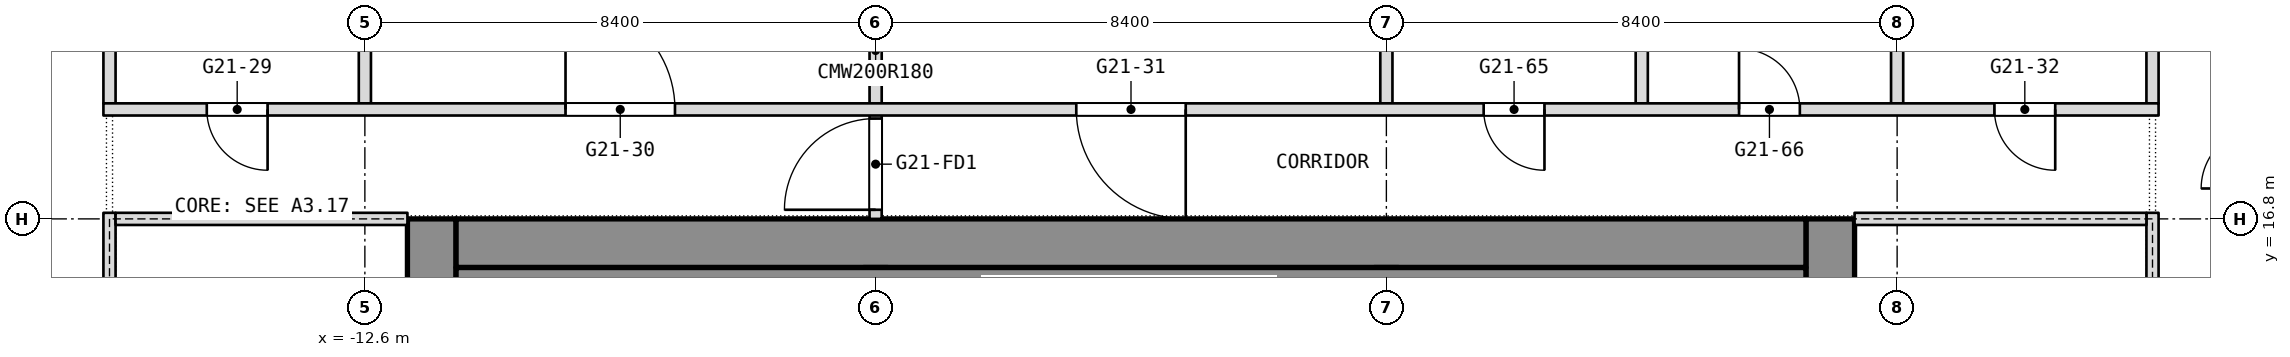
"""IFC4 building model, lengths in metres.
Left out: names, types, materials, properties, quantities, classifications, styles, units other than length and angle.
Written with IfcOpenShell. Run it as: python <this file> out.ifc"""

import sys

from ifc_helpers import new_model, si_unit, direction, frame, frame_2d, origin, place, context, subcontext, project, spatial, rectangle, extrude, element, fill, save


model = new_model("IFC4")
c1 = context("Model", 3, precision=1e-05, world=origin(), true_north=direction((0.0, 1.0)))
c2 = subcontext(c1, "Body", "Model", "MODEL_VIEW")
j1 = project(units=[si_unit("LENGTHUNIT", "METRE"), si_unit("PLANEANGLEUNIT", "RADIAN")], contexts=[c1])
p1 = place(None, origin())
s1 = spatial("IfcSite", under=j1, at=p1, CompositionType="ELEMENT")
p2 = place(p1, origin())
s2 = spatial("IfcBuilding", under=s1, at=p2, CompositionType="ELEMENT")
p3 = place(p2, frame((0.0, 0.0, 245.3)))
s3 = spatial("IfcBuildingStorey", under=s2, at=p3, CompositionType="ELEMENT", Elevation=245.3)
p4 = place(p3, frame((11.5, 0.0, 0.0), z_axis=(0.0, 0.0, 1.0), x_axis=(0.0, 1.0, 0.0)))
e1 = element("IfcWall", 1, at=p4, inside=s3, PredefinedType="SHEAR", context=c2, shape_type="SweptSolid", body=[
    extrude(rectangle(XDim=16.8, YDim=0.8, at=frame_2d((8.4, 0.0))), origin(), (0.0, 0.0, 1.0), 3.6),
])
p5 = place(p4, frame((2.3, 0.0, 0.0)))
e2 = element("IfcOpeningElement", 2, at=p5, cuts=e1, PredefinedType="OPENING", context=c2, shape_type="SweptSolid", body=[
    extrude(rectangle(XDim=1.1, YDim=2.1, at=frame_2d((0.55, 1.05))), frame((0.0, 0.4, 0.0), z_axis=(0.0, -1.0, 0.0), x_axis=(1.0, 0.0, 0.0)), (0.0, 0.0, 1.0), 0.8),
])
p6 = place(p4, frame((4.85, 0.0, 0.0)))
e3 = element("IfcOpeningElement", 3, at=p6, cuts=e1, PredefinedType="OPENING", context=c2, shape_type="SweptSolid", body=[
    extrude(rectangle(XDim=1.1, YDim=2.1, at=frame_2d((0.55, 1.05))), frame((0.0, 0.4, 0.0), z_axis=(0.0, -1.0, 0.0), x_axis=(1.0, 0.0, 0.0)), (0.0, 0.0, 1.0), 0.8),
])
p7 = place(p4, frame((6.825, 0.0, 0.0)))
e4 = element("IfcOpeningElement", 4, at=p7, cuts=e1, PredefinedType="OPENING", context=c2, shape_type="SweptSolid", body=[
    extrude(rectangle(XDim=1.2, YDim=2.1, at=frame_2d((0.6, 1.05))), frame((0.0, 0.4, 0.0), z_axis=(0.0, -1.0, 0.0), x_axis=(1.0, 0.0, 0.0)), (0.0, 0.0, 1.0), 0.8),
])
p8 = place(p4, frame((13.4, 0.0, 0.0)))
e5 = element("IfcOpeningElement", 5, at=p8, cuts=e1, PredefinedType="OPENING", context=c2, shape_type="SweptSolid", body=[
    extrude(rectangle(XDim=1.1, YDim=2.1, at=frame_2d((0.55, 1.05))), frame((0.0, 0.4, 0.0), z_axis=(0.0, -1.0, 0.0), x_axis=(1.0, 0.0, 0.0)), (0.0, 0.0, 1.0), 0.8),
])
p9 = place(p4, frame((10.85, 0.0, 0.0)))
e6 = element("IfcOpeningElement", 6, at=p9, cuts=e1, PredefinedType="OPENING", context=c2, shape_type="SweptSolid", body=[
    extrude(rectangle(XDim=1.1, YDim=2.1, at=frame_2d((0.55, 1.05))), frame((0.0, 0.4, 0.0), z_axis=(0.0, -1.0, 0.0), x_axis=(1.0, 0.0, 0.0)), (0.0, 0.0, 1.0), 0.8),
])
p10 = place(p4, frame((8.775, 0.0, 0.0)))
e7 = element("IfcOpeningElement", 7, at=p10, cuts=e1, PredefinedType="OPENING", context=c2, shape_type="SweptSolid", body=[
    extrude(rectangle(XDim=1.2, YDim=2.1, at=frame_2d((0.6, 1.05))), frame((0.0, 0.4, 0.0), z_axis=(0.0, -1.0, 0.0), x_axis=(1.0, 0.0, 0.0)), (0.0, 0.0, 1.0), 0.8),
])
p11 = place(p3, frame((-11.5, 0.0, 0.0), z_axis=(0.0, 0.0, 1.0), x_axis=(0.0, 1.0, 0.0)))
e8 = element("IfcWall", 8, at=p11, inside=s3, PredefinedType="SHEAR", context=c2, shape_type="SweptSolid", body=[
    extrude(rectangle(XDim=16.8, YDim=0.8, at=frame_2d((8.4, 0.0))), origin(), (0.0, 0.0, 1.0), 3.6),
])
p12 = place(p11, frame((3.6, 0.0, 0.0)))
e9 = element("IfcOpeningElement", 9, at=p12, cuts=e8, PredefinedType="OPENING", context=c2, shape_type="SweptSolid", body=[
    extrude(rectangle(XDim=0.9, YDim=2.1, at=frame_2d((0.45, 1.05))), frame((0.0, 0.4, 0.0), z_axis=(0.0, -1.0, 0.0), x_axis=(1.0, 0.0, 0.0)), (0.0, 0.0, 1.0), 0.8),
])
p13 = place(p11, frame((6.825, 0.0, 0.0)))
e10 = element("IfcOpeningElement", 10, at=p13, cuts=e8, PredefinedType="OPENING", context=c2, shape_type="SweptSolid", body=[
    extrude(rectangle(XDim=1.2, YDim=2.1, at=frame_2d((0.6, 1.05))), frame((0.0, 0.4, 0.0), z_axis=(0.0, -1.0, 0.0), x_axis=(1.0, 0.0, 0.0)), (0.0, 0.0, 1.0), 0.8),
])
p14 = place(p11, frame((14.062, 0.0, 0.0)))
e11 = element("IfcOpeningElement", 11, at=p14, cuts=e8, PredefinedType="OPENING", context=c2, shape_type="SweptSolid", body=[
    extrude(rectangle(XDim=0.9, YDim=2.1, at=frame_2d((0.45, 1.05))), frame((0.0, 0.4, 0.0), z_axis=(0.0, -1.0, 0.0), x_axis=(1.0, 0.0, 0.0)), (0.0, 0.0, 1.0), 0.8),
])
p15 = place(p11, frame((11.438, 0.0, 0.0)))
e12 = element("IfcOpeningElement", 12, at=p15, cuts=e8, PredefinedType="OPENING", context=c2, shape_type="SweptSolid", body=[
    extrude(rectangle(XDim=0.9, YDim=2.1, at=frame_2d((0.45, 1.05))), frame((0.0, 0.4, 0.0), z_axis=(0.0, -1.0, 0.0), x_axis=(1.0, 0.0, 0.0)), (0.0, 0.0, 1.0), 0.8),
])
p16 = place(p11, frame((8.775, 0.0, 0.0)))
e13 = element("IfcOpeningElement", 13, at=p16, cuts=e8, PredefinedType="OPENING", context=c2, shape_type="SweptSolid", body=[
    extrude(rectangle(XDim=1.2, YDim=2.1, at=frame_2d((0.6, 1.05))), frame((0.0, 0.4, 0.0), z_axis=(0.0, -1.0, 0.0), x_axis=(1.0, 0.0, 0.0)), (0.0, 0.0, 1.0), 0.8),
])
p17 = place(p3, frame((-11.1, 16.4, 0.0), z_axis=(0.0, 0.0, 1.0), x_axis=(1.0, 0.0, 0.0)))
e14 = element("IfcWall", 14, at=p17, inside=s3, PredefinedType="SHEAR", context=c2, shape_type="SweptSolid", body=[
    extrude(rectangle(XDim=22.2, YDim=0.8, at=frame_2d((11.1, 0.0))), origin(), (0.0, 0.0, 1.0), 3.6),
])
p18 = place(p3, frame((-4.2, 0.8, 0.0), z_axis=(0.0, 0.0, 1.0), x_axis=(0.0, 1.0, 0.0)))
e15 = element("IfcWall", 15, at=p18, inside=s3, PredefinedType="SHEAR", context=c2, shape_type="SweptSolid", body=[
    extrude(rectangle(XDim=15.2, YDim=0.4, at=frame_2d((7.6, 0.0))), origin(), (0.0, 0.0, 1.0), 3.6),
])
p19 = place(p18, frame((8.5, 0.0, 0.0)))
e16 = element("IfcOpeningElement", 16, at=p19, cuts=e15, PredefinedType="OPENING", context=c2, shape_type="SweptSolid", body=[
    extrude(rectangle(XDim=1.2, YDim=2.1, at=frame_2d((0.6, 1.05))), frame((0.0, 0.2, 0.0), z_axis=(0.0, -1.0, 0.0), x_axis=(1.0, 0.0, 0.0)), (0.0, 0.0, 1.0), 0.4),
])
p20 = place(p3, frame((4.2, 0.8, 0.0), z_axis=(0.0, 0.0, 1.0), x_axis=(0.0, 1.0, 0.0)))
e17 = element("IfcWall", 17, at=p20, inside=s3, PredefinedType="SHEAR", context=c2, shape_type="SweptSolid", body=[
    extrude(rectangle(XDim=15.2, YDim=0.4, at=frame_2d((7.6, 0.0))), origin(), (0.0, 0.0, 1.0), 3.6),
])
p21 = place(p20, frame((5.95, 0.0, 0.0)))
e18 = element("IfcOpeningElement", 18, at=p21, cuts=e17, PredefinedType="OPENING", context=c2, shape_type="SweptSolid", body=[
    extrude(rectangle(XDim=1.2, YDim=2.1, at=frame_2d((0.6, 1.05))), frame((0.0, 0.2, 0.0), z_axis=(0.0, -1.0, 0.0), x_axis=(1.0, 0.0, 0.0)), (0.0, 0.0, 1.0), 0.4),
])
for number, where, z_axis, x_axis in (
    (19, (16.8, 18.7, 0.0), (0.0, 0.0, 1.0), (0.0, 1.0, 0.0)),
    (20, (12.6, 18.7, 0.0), (0.0, 0.0, 1.0), (0.0, 1.0, 0.0)),
    (21, (8.4, 18.7, 0.0), (0.0, 0.0, 1.0), (0.0, 1.0, 0.0)),
    (22, (4.2, 18.7, 0.0), (0.0, 0.0, 1.0), (0.0, 1.0, 0.0)),
):
    element("IfcWall", number, at=place(p3, frame(where, z_axis=z_axis, x_axis=x_axis)), inside=s3, PredefinedType="PARTITIONING", context=c2, shape_type="SweptSolid", body=[
        extrude(rectangle(XDim=3.64, YDim=0.2, at=frame_2d((1.82, 0.0))), origin(), (0.0, 0.0, 1.0), 3.34),
    ])
p22 = place(p3, frame((-4.2, 16.8, 0.0), z_axis=(0.0, 0.0, 1.0), x_axis=(0.0, 1.0, 0.0)))
e23 = element("IfcWall", 23, at=p22, inside=s3, PredefinedType="PARTITIONING", context=c2, shape_type="SweptSolid", body=[
    extrude(rectangle(XDim=5.54, YDim=0.2, at=frame_2d((2.77, 0.0))), origin(), (0.0, 0.0, 1.0), 3.34),
])
p23 = place(p22, frame((0.15, 0.0, 0.0)))
e24 = element("IfcOpeningElement", 24, at=p23, cuts=e23, PredefinedType="OPENING", context=c2, shape_type="SweptSolid", body=[
    extrude(rectangle(XDim=1.5, YDim=2.1, at=frame_2d((0.75, 1.05))), frame((0.0, 0.1, 0.0), z_axis=(0.0, -1.0, 0.0), x_axis=(1.0, 0.0, 0.0)), (0.0, 0.0, 1.0), 0.2),
])
for number, where, z_axis, x_axis in (
    (25, (-12.6, 18.7, 0.0), (0.0, 0.0, 1.0), (0.0, 1.0, 0.0)),
    (26, (-16.8, 18.7, 0.0), (0.0, 0.0, 1.0), (0.0, 1.0, 0.0)),
):
    element("IfcWall", number, at=place(p3, frame(where, z_axis=z_axis, x_axis=x_axis)), inside=s3, PredefinedType="PARTITIONING", context=c2, shape_type="SweptSolid", body=[
        extrude(rectangle(XDim=3.64, YDim=0.2, at=frame_2d((1.82, 0.0))), origin(), (0.0, 0.0, 1.0), 3.34),
    ])
p24 = place(p3, frame((-16.9, 18.6, 0.0), z_axis=(0.0, 0.0, 1.0), x_axis=(1.0, 0.0, 0.0)))
e27 = element("IfcWall", 27, at=p24, inside=s3, PredefinedType="PARTITIONING", context=c2, shape_type="SweptSolid", body=[
    extrude(rectangle(XDim=33.8, YDim=0.2, at=frame_2d((16.9, 0.0))), origin(), (0.0, 0.0, 1.0), 3.34),
])
p25 = place(p24, frame((1.7, 0.0, 0.0)))
e28 = element("IfcOpeningElement", 28, at=p25, cuts=e27, PredefinedType="OPENING", context=c2, shape_type="SweptSolid", body=[
    extrude(rectangle(XDim=1.0, YDim=2.1, at=frame_2d((0.5, 1.05))), frame((0.0, 0.1, 0.0), z_axis=(0.0, -1.0, 0.0), x_axis=(1.0, 0.0, 0.0)), (0.0, 0.0, 1.0), 0.2),
])
p26 = place(p24, frame((7.6, 0.0, 0.0)))
e29 = element("IfcOpeningElement", 29, at=p26, cuts=e27, PredefinedType="OPENING", context=c2, shape_type="SweptSolid", body=[
    extrude(rectangle(XDim=1.8, YDim=2.1, at=frame_2d((0.9, 1.05))), frame((0.0, 0.1, 0.0), z_axis=(0.0, -1.0, 0.0), x_axis=(1.0, 0.0, 0.0)), (0.0, 0.0, 1.0), 0.2),
])
p27 = place(p24, frame((16.0, 0.0, 0.0)))
e30 = element("IfcOpeningElement", 30, at=p27, cuts=e27, PredefinedType="OPENING", context=c2, shape_type="SweptSolid", body=[
    extrude(rectangle(XDim=1.8, YDim=2.1, at=frame_2d((0.9, 1.05))), frame((0.0, 0.1, 0.0), z_axis=(0.0, -1.0, 0.0), x_axis=(1.0, 0.0, 0.0)), (0.0, 0.0, 1.0), 0.2),
])
p28 = place(p24, frame((31.1, 0.0, 0.0)))
e31 = element("IfcOpeningElement", 31, at=p28, cuts=e27, PredefinedType="OPENING", context=c2, shape_type="SweptSolid", body=[
    extrude(rectangle(XDim=1.0, YDim=2.1, at=frame_2d((0.5, 1.05))), frame((0.0, 0.1, 0.0), z_axis=(0.0, -1.0, 0.0), x_axis=(1.0, 0.0, 0.0)), (0.0, 0.0, 1.0), 0.2),
])
p29 = place(p24, frame((22.7, 0.0, 0.0)))
e32 = element("IfcOpeningElement", 32, at=p29, cuts=e27, PredefinedType="OPENING", context=c2, shape_type="SweptSolid", body=[
    extrude(rectangle(XDim=1.0, YDim=2.1, at=frame_2d((0.5, 1.05))), frame((0.0, 0.1, 0.0), z_axis=(0.0, -1.0, 0.0), x_axis=(1.0, 0.0, 0.0)), (0.0, 0.0, 1.0), 0.2),
])
p30 = place(p24, frame((26.9, 0.0, 0.0)))
e33 = element("IfcOpeningElement", 33, at=p30, cuts=e27, PredefinedType="OPENING", context=c2, shape_type="SweptSolid", body=[
    extrude(rectangle(XDim=1.0, YDim=2.1, at=frame_2d((0.5, 1.05))), frame((0.0, 0.1, 0.0), z_axis=(0.0, -1.0, 0.0), x_axis=(1.0, 0.0, 0.0)), (0.0, 0.0, 1.0), 0.2),
])
p31 = place(p3, frame((-11.1, 15.65, 0.0), z_axis=(0.0, 0.0, 1.0), x_axis=(1.0, 0.0, 0.0)))
e34 = element("IfcWall", 34, at=p31, inside=s3, PredefinedType="PARTITIONING", context=c2, shape_type="SweptSolid", body=[
    extrude(rectangle(XDim=22.2, YDim=0.7, at=frame_2d((11.1, 0.0))), origin(), (0.0, 0.0, 1.0), 3.34),
])
p32 = place(p3, frame((-16.8, -0.1, 0.0), z_axis=(0.0, 0.0, 1.0), x_axis=(0.0, 1.0, 0.0)))
e35 = element("IfcWall", 35, at=p32, inside=s3, PredefinedType="PARTITIONING", context=c2, shape_type="SweptSolid", body=[
    extrude(rectangle(XDim=17.0, YDim=0.2, at=frame_2d((8.5, 0.0))), origin(), (0.0, 0.0, 1.0), 3.34),
])
p33 = place(p32, frame((2.2, 0.0, 0.0)))
e36 = element("IfcOpeningElement", 36, at=p33, cuts=e35, PredefinedType="OPENING", context=c2, shape_type="SweptSolid", body=[
    extrude(rectangle(XDim=1.8, YDim=2.1, at=frame_2d((0.9, 1.05))), frame((0.0, 0.1, 0.0), z_axis=(0.0, -1.0, 0.0), x_axis=(1.0, 0.0, 0.0)), (0.0, 0.0, 1.0), 0.2),
])
p34 = place(p32, frame((13.0, 0.0, 0.0)))
e37 = element("IfcOpeningElement", 37, at=p34, cuts=e35, PredefinedType="OPENING", context=c2, shape_type="SweptSolid", body=[
    extrude(rectangle(XDim=1.8, YDim=2.1, at=frame_2d((0.9, 1.05))), frame((0.0, 0.1, 0.0), z_axis=(0.0, -1.0, 0.0), x_axis=(1.0, 0.0, 0.0)), (0.0, 0.0, 1.0), 0.2),
])
p35 = place(p3, frame((-16.7, 16.8, 0.0), z_axis=(0.0, 0.0, 1.0), x_axis=(1.0, 0.0, 0.0)))
e38 = element("IfcWall", 38, at=p35, inside=s3, PredefinedType="PARTITIONING", context=c2, shape_type="SweptSolid", body=[
    extrude(rectangle(XDim=4.8, YDim=0.2, at=frame_2d((2.4, 0.0))), origin(), (0.0, 0.0, 1.0), 2.94),
])
p36 = place(p3, frame((16.8, -0.1, 0.0), z_axis=(0.0, 0.0, 1.0), x_axis=(0.0, 1.0, 0.0)))
e39 = element("IfcWall", 39, at=p36, inside=s3, PredefinedType="PARTITIONING", context=c2, shape_type="SweptSolid", body=[
    extrude(rectangle(XDim=17.0, YDim=0.2, at=frame_2d((8.5, 0.0))), origin(), (0.0, 0.0, 1.0), 3.34),
])
p37 = place(p36, frame((2.2, 0.0, 0.0)))
e40 = element("IfcOpeningElement", 40, at=p37, cuts=e39, PredefinedType="OPENING", context=c2, shape_type="SweptSolid", body=[
    extrude(rectangle(XDim=1.8, YDim=2.1, at=frame_2d((0.9, 1.05))), frame((0.0, 0.1, 0.0), z_axis=(0.0, -1.0, 0.0), x_axis=(1.0, 0.0, 0.0)), (0.0, 0.0, 1.0), 0.2),
])
p38 = place(p36, frame((13.0, 0.0, 0.0)))
e41 = element("IfcOpeningElement", 41, at=p38, cuts=e39, PredefinedType="OPENING", context=c2, shape_type="SweptSolid", body=[
    extrude(rectangle(XDim=1.8, YDim=2.1, at=frame_2d((0.9, 1.05))), frame((0.0, 0.1, 0.0), z_axis=(0.0, -1.0, 0.0), x_axis=(1.0, 0.0, 0.0)), (0.0, 0.0, 1.0), 0.2),
])
p39 = place(p3, frame((11.9, 16.8, 0.0), z_axis=(0.0, 0.0, 1.0), x_axis=(1.0, 0.0, 0.0)))
e42 = element("IfcWall", 42, at=p39, inside=s3, PredefinedType="PARTITIONING", context=c2, shape_type="SweptSolid", body=[
    extrude(rectangle(XDim=4.8, YDim=0.2, at=frame_2d((2.4, 0.0))), origin(), (0.0, 0.0, 1.0), 2.94),
])
p40 = place(p25, origin())
e43 = element("IfcDoor", 43, at=p40, inside=s3, OperationType="SINGLE_SWING_LEFT", PredefinedType="DOOR", context=c2, shape_type="SweptSolid", body=[
    extrude(rectangle(XDim=1.0, YDim=2.1, at=frame_2d((0.5, 1.05))), frame((0.0, 0.025, 0.0), z_axis=(0.0, -1.0, 0.0), x_axis=(1.0, 0.0, 0.0)), (0.0, 0.0, 1.0), 0.05),
])
fill(e28, e43)
p41 = place(p26, origin())
e44 = element("IfcDoor", 44, at=p41, inside=s3, OperationType="DOUBLE_DOOR_SINGLE_SWING", PredefinedType="DOOR", context=c2, shape_type="SweptSolid", body=[
    extrude(rectangle(XDim=1.8, YDim=2.1, at=frame_2d((0.9, 1.05))), frame((0.0, 0.025, 0.0), z_axis=(0.0, -1.0, 0.0), x_axis=(1.0, 0.0, 0.0)), (0.0, 0.0, 1.0), 0.05),
])
fill(e29, e44)
p42 = place(p27, origin())
e45 = element("IfcDoor", 45, at=p42, inside=s3, OperationType="DOUBLE_DOOR_SINGLE_SWING", PredefinedType="DOOR", context=c2, shape_type="SweptSolid", body=[
    extrude(rectangle(XDim=1.8, YDim=2.1, at=frame_2d((0.9, 1.05))), frame((0.0, 0.025, 0.0), z_axis=(0.0, -1.0, 0.0), x_axis=(1.0, 0.0, 0.0)), (0.0, 0.0, 1.0), 0.05),
])
fill(e30, e45)
p43 = place(p28, origin())
e46 = element("IfcDoor", 46, at=p43, inside=s3, OperationType="SINGLE_SWING_RIGHT", PredefinedType="DOOR", context=c2, shape_type="SweptSolid", body=[
    extrude(rectangle(XDim=1.0, YDim=2.1, at=frame_2d((0.5, 1.05))), frame((0.0, 0.025, 0.0), z_axis=(0.0, -1.0, 0.0), x_axis=(1.0, 0.0, 0.0)), (0.0, 0.0, 1.0), 0.05),
])
fill(e31, e46)
p44 = place(p29, origin())
e47 = element("IfcDoor", 47, at=p44, inside=s3, OperationType="SINGLE_SWING_LEFT", PredefinedType="DOOR", context=c2, shape_type="SweptSolid", body=[
    extrude(rectangle(XDim=1.0, YDim=2.1, at=frame_2d((0.5, 1.05))), frame((0.0, 0.025, 0.0), z_axis=(0.0, -1.0, 0.0), x_axis=(1.0, 0.0, 0.0)), (0.0, 0.0, 1.0), 0.05),
])
fill(e32, e47)
p45 = place(p30, origin())
e48 = element("IfcDoor", 48, at=p45, inside=s3, OperationType="SINGLE_SWING_RIGHT", PredefinedType="DOOR", context=c2, shape_type="SweptSolid", body=[
    extrude(rectangle(XDim=1.0, YDim=2.1, at=frame_2d((0.5, 1.05))), frame((0.0, 0.025, 0.0), z_axis=(0.0, -1.0, 0.0), x_axis=(1.0, 0.0, 0.0)), (0.0, 0.0, 1.0), 0.05),
])
fill(e33, e48)
p46 = place(p23, origin())
e49 = element("IfcDoor", 49, at=p46, inside=s3, OperationType="DOUBLE_DOOR_DOUBLE_SWING", PredefinedType="DOOR", context=c2, shape_type="SweptSolid", body=[
    extrude(rectangle(XDim=1.5, YDim=2.1, at=frame_2d((0.75, 1.05))), frame((0.0, 0.025, 0.0), z_axis=(0.0, -1.0, 0.0), x_axis=(1.0, 0.0, 0.0)), (0.0, 0.0, 1.0), 0.05),
])
fill(e24, e49)
save(model, sys.argv[1])
